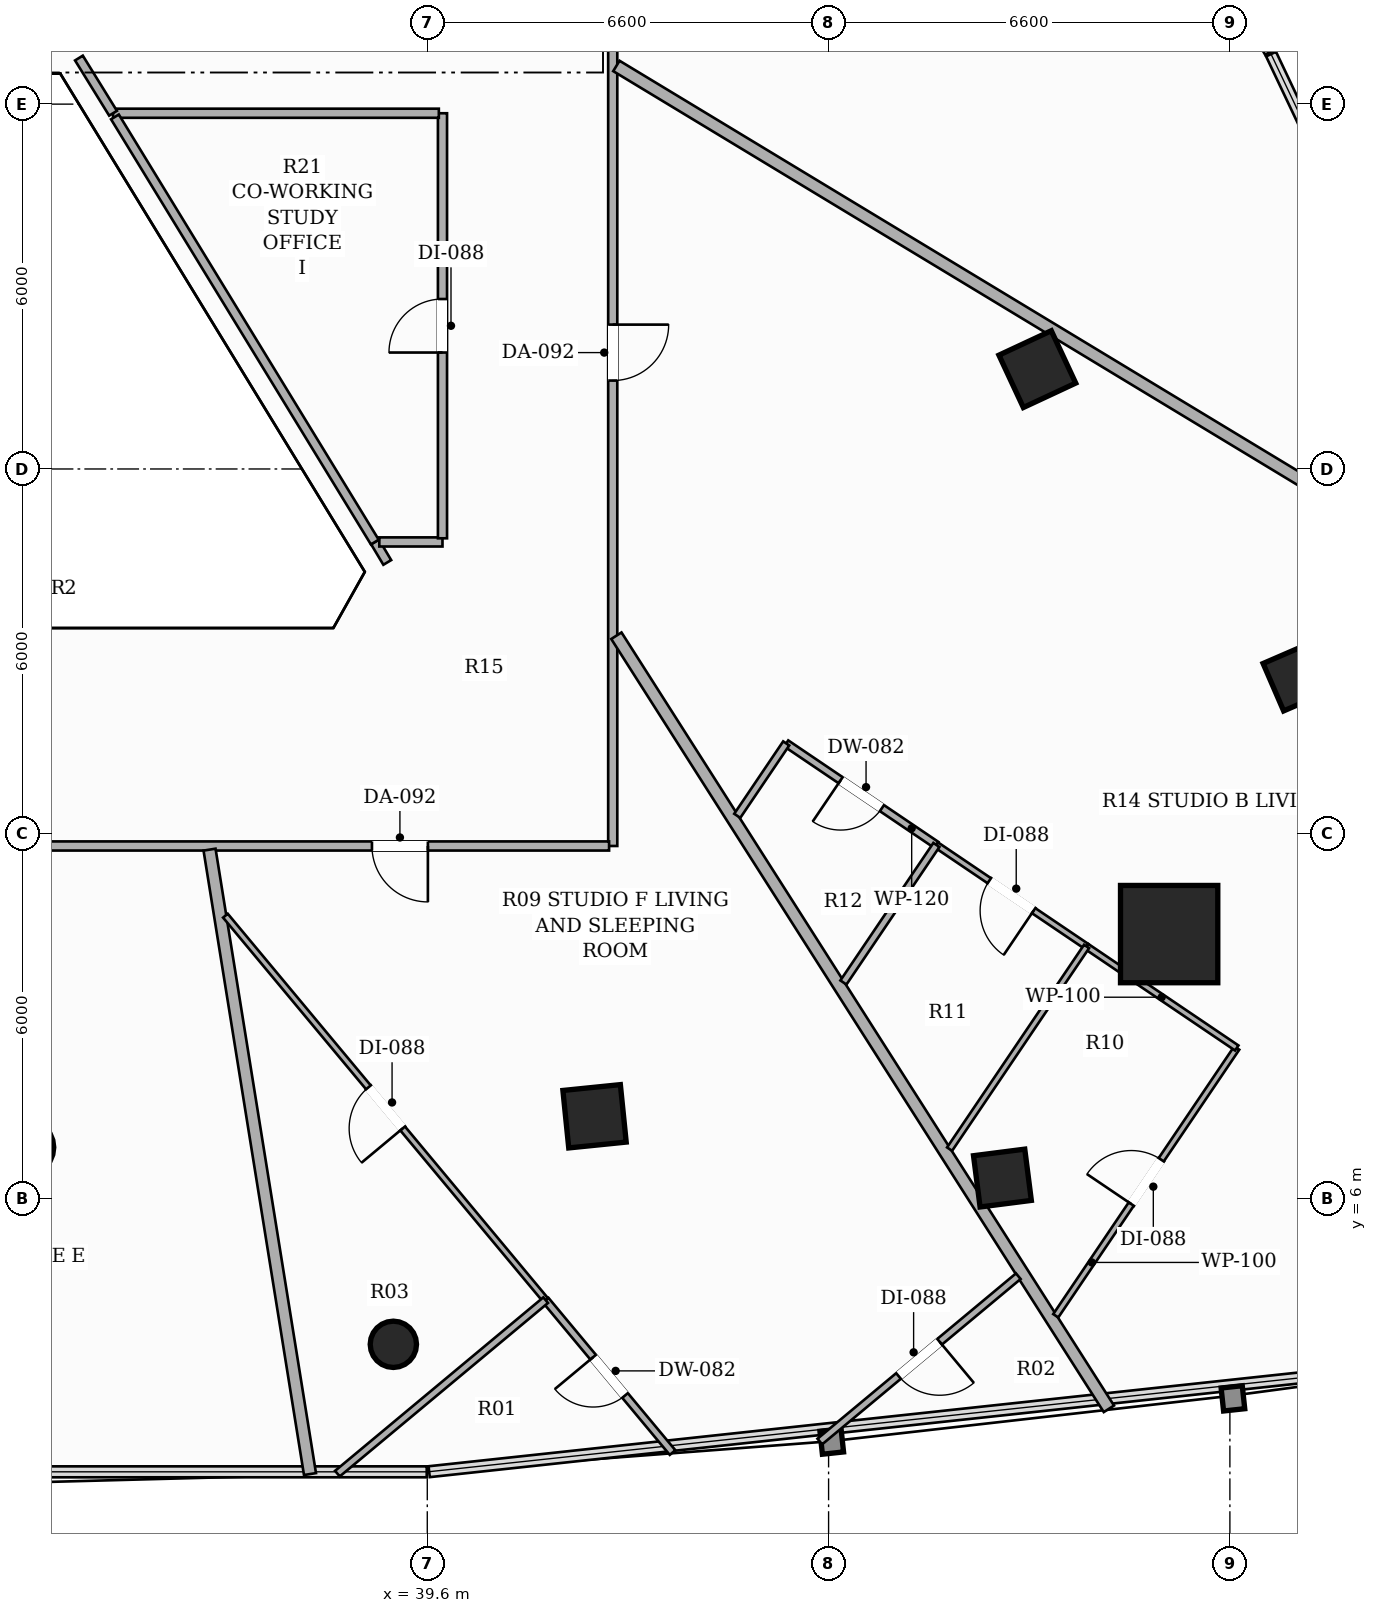
"""IFC4 building model, lengths in metres.
Left out: names, types, materials, properties, quantities, classifications, styles, units other than length and angle.
Written with IfcOpenShell. Run it as: python <this file> out.ifc"""

import sys

from ifc_helpers import new_model, si_unit, direction, frame, frame_2d, origin, origin_2d, place, context, subcontext, project, spatial, rectangle, hollow_rectangle, hollow_circle, extrude, element, fill, save


model = new_model("IFC4")
c1 = context("Model", 3, precision=1e-05, world=origin(), true_north=direction((0.0, 1.0)))
c2 = subcontext(c1, "Body", "Model", "MODEL_VIEW")
j1 = project(units=[si_unit("LENGTHUNIT", "METRE"), si_unit("PLANEANGLEUNIT", "RADIAN")], contexts=[c1])
p1 = place(None, origin())
s1 = spatial("IfcSite", under=j1, at=p1, CompositionType="ELEMENT")
p2 = place(p1, origin())
s2 = spatial("IfcBuilding", under=s1, at=p2, CompositionType="ELEMENT")
p3 = place(p2, frame((0.0, 0.0, 46.7)))
s3 = spatial("IfcBuildingStorey", under=s2, at=p3, CompositionType="ELEMENT", Elevation=46.7)
p4 = place(p3, frame((51.801, 10.351, 0.0), z_axis=(0.0, 0.0, 1.0), x_axis=(1.0, 0.0, 0.0)))
e1 = element("IfcColumn", 1, at=p4, inside=s3, PredefinedType="COLUMN", context=c2, shape_type="SweptSolid", body=[
    extrude(hollow_rectangle(XDim=1.6, YDim=1.6, WallThickness=0.05, at=origin_2d()), origin(), (0.0, 0.0, 1.0), 3.3),
])
p5 = place(p3, frame((33.0, 6.844, 0.0), z_axis=(0.0, 0.0, 1.0), x_axis=(1.0, 0.0, 0.0)))
e2 = element("IfcColumn", 2, at=p5, inside=s3, PredefinedType="COLUMN", context=c2, shape_type="SweptSolid", body=[
    extrude(hollow_circle(Radius=0.457, WallThickness=0.025, at=origin_2d()), origin(), (0.0, 0.0, 1.0), 3.3),
])
for number, where, z_axis, x_axis in (
    (3, (42.351, 7.355, 0.0), (0.0, 0.0, 1.0), (0.995, 0.101, 0.0)),
    (4, (49.633, 19.642, 0.0), (0.0, 0.0, 1.0), (-0.423, 0.906, 0.0)),
):
    element("IfcColumn", number, at=place(p3, frame(where, z_axis=z_axis, x_axis=x_axis)), inside=s3, PredefinedType="COLUMN", context=c2, shape_type="SweptSolid", body=[
        extrude(hollow_rectangle(XDim=0.95, YDim=0.95, WallThickness=0.032, at=origin_2d()), origin(), (0.0, 0.0, 1.0), 3.3),
    ])
for number, where, z_axis, x_axis in (
    (5, (49.059, 6.339, 0.0), (0.0, 0.0, 1.0), (0.992, 0.127, 0.0)),
    (6, (53.905, 14.58, 0.0), (0.0, 0.0, 1.0), (-0.397, 0.918, 0.0)),
):
    element("IfcColumn", number, at=place(p3, frame(where, z_axis=z_axis, x_axis=x_axis)), inside=s3, PredefinedType="COLUMN", context=c2, shape_type="SweptSolid", body=[
        extrude(hollow_rectangle(XDim=0.85, YDim=0.85, WallThickness=0.028, at=origin_2d()), origin(), (0.0, 0.0, 1.0), 3.3),
    ])
p6 = place(p3, frame((39.042, 3.605, 0.0), z_axis=(0.0, 0.0, 1.0), x_axis=(1.0, 0.0, 0.0)))
e7 = element("IfcColumn", 7, at=p6, inside=s3, PredefinedType="COLUMN", context=c2, shape_type="SweptSolid", body=[
    extrude(hollow_circle(Radius=0.381, WallThickness=0.022, at=origin_2d()), origin(), (0.0, 0.0, 1.0), 3.3),
])
p7 = place(p3, frame((42.65, 36.84, 0.0), z_axis=(0.0, 0.0, 1.0), x_axis=(0.0, -1.0, 0.0)))
e8 = element("IfcWall", 8, at=p7, inside=s3, PredefinedType="PARTITIONING", context=c2, shape_type="SweptSolid", body=[
    extrude(rectangle(XDim=25.04, YDim=0.15, at=frame_2d((12.52, 0.0))), origin(), (0.0, 0.0, 1.0), 2.413),
])
p8 = place(p7, frame((16.466, 0.0, 0.0)))
e9 = element("IfcOpeningElement", 9, at=p8, cuts=e8, PredefinedType="OPENING", context=c2, shape_type="SweptSolid", body=[
    extrude(rectangle(XDim=0.92, YDim=2.15, at=frame_2d((0.46, 1.075))), frame((0.0, 0.085, 0.0), z_axis=(0.0, -1.0, 0.0), x_axis=(1.0, 0.0, 0.0)), (0.0, 0.0, 1.0), 0.17),
])
p9 = place(p7, frame((5.796, 0.0, 0.0)))
e10 = element("IfcOpeningElement", 10, at=p9, cuts=e8, PredefinedType="OPENING", context=c2, shape_type="SweptSolid", body=[
    extrude(rectangle(XDim=0.92, YDim=2.15, at=frame_2d((0.46, 1.075))), frame((0.0, 0.085, 0.0), z_axis=(0.0, -1.0, 0.0), x_axis=(1.0, 0.0, 0.0)), (0.0, 0.0, 1.0), 0.17),
])
p10 = place(p3, frame((42.59, 11.8, 0.0), z_axis=(0.0, 0.0, 1.0), x_axis=(-1.0, 0.0, 0.0)))
e11 = element("IfcWall", 11, at=p10, inside=s3, PredefinedType="PARTITIONING", context=c2, shape_type="SweptSolid", body=[
    extrude(rectangle(XDim=19.24, YDim=0.15, at=frame_2d((9.62, 0.0))), origin(), (0.0, 0.0, 1.0), 2.669),
])
p11 = place(p10, frame((10.508, 0.0, 0.0)))
e12 = element("IfcOpeningElement", 12, at=p11, cuts=e11, PredefinedType="OPENING", context=c2, shape_type="SweptSolid", body=[
    extrude(rectangle(XDim=0.88, YDim=2.1, at=frame_2d((0.44, 1.05))), frame((0.0, 0.085, 0.0), z_axis=(0.0, -1.0, 0.0), x_axis=(1.0, 0.0, 0.0)), (0.0, 0.0, 1.0), 0.17),
])
p12 = place(p10, frame((2.98, 0.0, 0.0)))
e13 = element("IfcOpeningElement", 13, at=p12, cuts=e11, PredefinedType="OPENING", context=c2, shape_type="SweptSolid", body=[
    extrude(rectangle(XDim=0.92, YDim=2.15, at=frame_2d((0.46, 1.075))), frame((0.0, 0.085, 0.0), z_axis=(0.0, -1.0, 0.0), x_axis=(1.0, 0.0, 0.0)), (0.0, 0.0, 1.0), 0.17),
])
p13 = place(p3, frame((38.942, 16.463, 0.0), z_axis=(0.0, 0.0, 1.0), x_axis=(-0.511932152937, 0.859025884819, 0.0)))
e14 = element("IfcWall", 14, at=p13, inside=s3, PredefinedType="PARTITIONING", context=c2, shape_type="SweptSolid", body=[
    extrude(rectangle(XDim=0.393, YDim=0.15, at=frame_2d((0.196, 0.0))), origin(), (0.0, 0.0, 1.0), 3.06),
])
p14 = place(p3, frame((38.811, 16.8, 0.0), z_axis=(0.0, 0.0, 1.0), x_axis=(1.0, 0.0, 0.0)))
e15 = element("IfcWall", 15, at=p14, inside=s3, PredefinedType="PARTITIONING", context=c2, shape_type="SweptSolid", body=[
    extrude(rectangle(XDim=1.039, YDim=0.15, at=frame_2d((0.52, 0.0))), origin(), (0.0, 0.0, 1.0), 3.06),
])
p15 = place(p3, frame((39.85, 16.86, 0.0), z_axis=(0.0, 0.0, 1.0), x_axis=(0.0, 1.0, 0.0)))
e16 = element("IfcWall", 16, at=p15, inside=s3, PredefinedType="PARTITIONING", context=c2, shape_type="SweptSolid", body=[
    extrude(rectangle(XDim=6.99, YDim=0.15, at=frame_2d((3.495, 0.0))), origin(), (0.0, 0.0, 1.0), 2.669),
])
p16 = place(p15, frame((3.055, 0.0, 0.0)))
e17 = element("IfcOpeningElement", 17, at=p16, cuts=e16, PredefinedType="OPENING", context=c2, shape_type="SweptSolid", body=[
    extrude(rectangle(XDim=0.88, YDim=2.1, at=frame_2d((0.44, 1.05))), frame((0.0, 0.085, 0.0), z_axis=(0.0, -1.0, 0.0), x_axis=(1.0, 0.0, 0.0)), (0.0, 0.0, 1.0), 0.17),
])
p17 = place(p3, frame((39.79, 23.85, 0.0), z_axis=(0.0, 0.0, 1.0), x_axis=(-1.0, 0.0, 0.0)))
e18 = element("IfcWall", 18, at=p17, inside=s3, PredefinedType="PARTITIONING", context=c2, shape_type="SweptSolid", body=[
    extrude(rectangle(XDim=5.358, YDim=0.15, at=frame_2d((2.679, 0.0))), origin(), (0.0, 0.0, 1.0), 2.669),
])
p18 = place(p3, frame((34.432, 23.85, 0.0), z_axis=(0.0, 0.0, 1.0), x_axis=(-0.525488010188, 0.850801005611, 0.0)))
e19 = element("IfcWall", 19, at=p18, inside=s3, PredefinedType="PARTITIONING", context=c2, shape_type="SweptSolid", body=[
    extrude(rectangle(XDim=1.067, YDim=0.15, at=frame_2d((0.534, 0.0))), origin(), (0.0, 0.0, 1.0), 3.06),
])
p19 = place(p3, frame((34.463, 23.79, 0.0), z_axis=(0.0, 0.0, 1.0), x_axis=(0.521566895949, -0.853210392019, 0.0)))
e20 = element("IfcWall", 20, at=p19, inside=s3, PredefinedType="PARTITIONING", context=c2, shape_type="SweptSolid", body=[
    extrude(rectangle(XDim=8.195, YDim=0.15, at=frame_2d((4.097, 0.0))), origin(), (0.0, 0.0, 1.0), 2.669),
])
p20 = place(p3, frame((42.71, 24.628, 0.0), z_axis=(0.0, 0.0, 1.0), x_axis=(0.85570509792, -0.517463801047, 0.0)))
e21 = element("IfcWall", 21, at=p20, inside=s3, PredefinedType="PARTITIONING", context=c2, shape_type="SweptSolid", body=[
    extrude(rectangle(XDim=17.86, YDim=0.2, at=frame_2d((8.93, 0.0))), origin(), (0.0, 0.0, 1.0), 2.413),
])
p21 = place(p3, frame((50.81, 2.544, 0.0), z_axis=(0.0, 0.0, 1.0), x_axis=(-0.537314491885, 0.843381963769, 0.0)))
e22 = element("IfcWall", 22, at=p21, inside=s3, PredefinedType="PARTITIONING", context=c2, shape_type="SweptSolid", body=[
    extrude(rectangle(XDim=15.075, YDim=0.2, at=frame_2d((7.538, 0.0))), origin(), (0.0, 0.0, 1.0), 2.413),
])
p22 = place(p3, frame((36.019, 11.74, 0.0), z_axis=(0.0, 0.0, 1.0), x_axis=(0.158816201081, -0.98730816581, 0.0)))
e23 = element("IfcWall", 23, at=p22, inside=s3, PredefinedType="PARTITIONING", context=c2, shape_type="SweptSolid", body=[
    extrude(rectangle(XDim=10.401, YDim=0.2, at=frame_2d((5.201, 0.0))), origin(), (0.0, 0.0, 1.0), 2.413),
])
p23 = place(p3, frame((47.973, 11.817, 0.0), z_axis=(0.0, 0.0, 1.0), x_axis=(-0.82839181121, 0.560149093653, 0.0)))
e24 = element("IfcWall", 24, at=p23, inside=s3, PredefinedType="PARTITIONING", context=c2, shape_type="SweptSolid", body=[
    extrude(rectangle(XDim=2.982, YDim=0.12, at=frame_2d((1.491, 0.0))), origin(), (0.0, 0.0, 1.0), 2.669),
])
p24 = place(p23, frame((1.081, 0.0, 0.0)))
e25 = element("IfcOpeningElement", 25, at=p24, cuts=e24, PredefinedType="OPENING", context=c2, shape_type="SweptSolid", body=[
    extrude(rectangle(XDim=0.82, YDim=2.1, at=frame_2d((0.41, 1.05))), frame((0.0, 0.07, 0.0), z_axis=(0.0, -1.0, 0.0), x_axis=(1.0, 0.0, 0.0)), (0.0, 0.0, 1.0), 0.14),
])
p25 = place(p3, frame((45.503, 13.487, 0.0), z_axis=(0.0, 0.0, 1.0), x_axis=(-0.559901526605, -0.828559159328, 0.0)))
e26 = element("IfcWall", 26, at=p25, inside=s3, PredefinedType="PARTITIONING", context=c2, shape_type="SweptSolid", body=[
    extrude(rectangle(XDim=1.438, YDim=0.12, at=frame_2d((0.719, 0.0))), origin(), (0.0, 0.0, 1.0), 2.669),
])
p26 = place(p3, frame((49.936, 4.074, 0.0), z_axis=(0.0, 0.0, 1.0), x_axis=(0.560030395854, 0.828472060917, 0.0)))
e27 = element("IfcWall", 27, at=p26, inside=s3, PredefinedType="PARTITIONING", context=c2, shape_type="SweptSolid", body=[
    extrude(rectangle(XDim=5.316, YDim=0.1, at=frame_2d((2.658, 0.0))), origin(), (0.0, 0.0, 1.0), 3.06),
])
p27 = place(p26, frame((2.218, 0.0, 0.0)))
e28 = element("IfcOpeningElement", 28, at=p27, cuts=e27, PredefinedType="OPENING", context=c2, shape_type="SweptSolid", body=[
    extrude(rectangle(XDim=0.88, YDim=2.1, at=frame_2d((0.44, 1.05))), frame((0.0, 0.06, 0.0), z_axis=(0.0, -1.0, 0.0), x_axis=(1.0, 0.0, 0.0)), (0.0, 0.0, 1.0), 0.12),
])
p28 = place(p3, frame((52.913, 8.478, 0.0), z_axis=(0.0, 0.0, 1.0), x_axis=(-0.828429805787, 0.560092900226, 0.0)))
e29 = element("IfcWall", 29, at=p28, inside=s3, PredefinedType="PARTITIONING", context=c2, shape_type="SweptSolid", body=[
    extrude(rectangle(XDim=2.981, YDim=0.1, at=frame_2d((1.491, 0.0))), origin(), (0.0, 0.0, 1.0), 2.413),
])
p29 = place(p3, frame((50.443, 10.148, 0.0), z_axis=(0.0, 0.0, 1.0), x_axis=(-0.828607449923, 0.559830058082, 0.0)))
e30 = element("IfcWall", 30, at=p29, inside=s3, PredefinedType="PARTITIONING", context=c2, shape_type="SweptSolid", body=[
    extrude(rectangle(XDim=2.981, YDim=0.1, at=frame_2d((1.491, 0.0))), origin(), (0.0, 0.0, 1.0), 3.06),
])
p30 = place(p29, frame((1.051, 0.0, 0.0)))
e31 = element("IfcOpeningElement", 31, at=p30, cuts=e30, PredefinedType="OPENING", context=c2, shape_type="SweptSolid", body=[
    extrude(rectangle(XDim=0.88, YDim=2.1, at=frame_2d((0.44, 1.05))), frame((0.0, 0.06, 0.0), z_axis=(0.0, -1.0, 0.0), x_axis=(1.0, 0.0, 0.0)), (0.0, 0.0, 1.0), 0.12),
])
p31 = place(p3, frame((47.973, 11.817, 0.0), z_axis=(0.0, 0.0, 1.0), x_axis=(-0.559971898906, -0.828511600665, 0.0)))
e32 = element("IfcWall", 32, at=p31, inside=s3, PredefinedType="PARTITIONING", context=c2, shape_type="SweptSolid", body=[
    extrude(rectangle(XDim=2.73, YDim=0.12, at=frame_2d((1.365, 0.0))), origin(), (0.0, 0.0, 1.0), 2.669),
])
p32 = place(p3, frame((48.19, 6.815, 0.0), z_axis=(0.0, 0.0, 1.0), x_axis=(0.560052199206, 0.828457321873, 0.0)))
e33 = element("IfcWall", 33, at=p32, inside=s3, PredefinedType="PARTITIONING", context=c2, shape_type="SweptSolid", body=[
    extrude(rectangle(XDim=4.023, YDim=0.1, at=frame_2d((2.012, 0.0))), origin(), (0.0, 0.0, 1.0), 2.413),
])
p33 = place(p3, frame((43.634, 1.825, 0.0), z_axis=(0.0, 0.0, 1.0), x_axis=(-0.639911914418, 0.768448268777, 0.0)))
e34 = element("IfcWall", 34, at=p33, inside=s3, PredefinedType="PARTITIONING", context=c2, shape_type="SweptSolid", body=[
    extrude(rectangle(XDim=3.261, YDim=0.12, at=frame_2d((1.631, 0.0))), origin(), (0.0, 0.0, 1.0), 3.06),
])
p34 = place(p33, frame((1.221, 0.0, 0.0)))
e35 = element("IfcOpeningElement", 35, at=p34, cuts=e34, PredefinedType="OPENING", context=c2, shape_type="SweptSolid", body=[
    extrude(rectangle(XDim=0.82, YDim=2.1, at=frame_2d((0.41, 1.05))), frame((0.0, 0.07, 0.0), z_axis=(0.0, -1.0, 0.0), x_axis=(1.0, 0.0, 0.0)), (0.0, 0.0, 1.0), 0.14),
])
p35 = place(p3, frame((49.32, 4.725, 0.0), z_axis=(0.0, 0.0, 1.0), x_axis=(-0.768353158093, -0.640026112317, 0.0)))
e36 = element("IfcWall", 36, at=p35, inside=s3, PredefinedType="PARTITIONING", context=c2, shape_type="SweptSolid", body=[
    extrude(rectangle(XDim=4.248, YDim=0.12, at=frame_2d((2.124, 0.0))), origin(), (0.0, 0.0, 1.0), 3.06),
])
p36 = place(p35, frame((1.684, 0.0, 0.0)))
e37 = element("IfcOpeningElement", 37, at=p36, cuts=e36, PredefinedType="OPENING", context=c2, shape_type="SweptSolid", body=[
    extrude(rectangle(XDim=0.88, YDim=2.1, at=frame_2d((0.44, 1.05))), frame((0.0, 0.07, 0.0), z_axis=(0.0, -1.0, 0.0), x_axis=(1.0, 0.0, 0.0)), (0.0, 0.0, 1.0), 0.14),
])
p37 = place(p3, frame((41.547, 4.331, 0.0), z_axis=(0.0, 0.0, 1.0), x_axis=(-0.640035566376, 0.768345282913, 0.0)))
e38 = element("IfcWall", 38, at=p37, inside=s3, PredefinedType="PARTITIONING", context=c2, shape_type="SweptSolid", body=[
    extrude(rectangle(XDim=8.229, YDim=0.1, at=frame_2d((4.115, 0.0))), origin(), (0.0, 0.0, 1.0), 2.413),
])
p38 = place(p37, frame((3.675, 0.0, 0.0)))
e39 = element("IfcOpeningElement", 39, at=p38, cuts=e38, PredefinedType="OPENING", context=c2, shape_type="SweptSolid", body=[
    extrude(rectangle(XDim=0.88, YDim=2.1, at=frame_2d((0.44, 1.05))), frame((0.0, 0.06, 0.0), z_axis=(0.0, -1.0, 0.0), x_axis=(1.0, 0.0, 0.0)), (0.0, 0.0, 1.0), 0.12),
])
p39 = place(p3, frame((38.122, 1.478, 0.0), z_axis=(0.0, 0.0, 1.0), x_axis=(0.768351451836, 0.640028160678, 0.0)))
e40 = element("IfcWall", 40, at=p39, inside=s3, PredefinedType="PARTITIONING", context=c2, shape_type="SweptSolid", body=[
    extrude(rectangle(XDim=4.458, YDim=0.12, at=frame_2d((2.229, 0.0))), origin(), (0.0, 0.0, 1.0), 3.06),
])
p40 = place(p8, origin())
e41 = element("IfcDoor", 41, at=p40, inside=s3, OperationType="SINGLE_SWING_LEFT", PredefinedType="DOOR", context=c2, shape_type="SweptSolid", body=[
    extrude(rectangle(XDim=0.92, YDim=2.15, at=frame_2d((0.46, 1.075))), frame((0.0, 0.025, 0.0), z_axis=(0.0, -1.0, 0.0), x_axis=(1.0, 0.0, 0.0)), (0.0, 0.0, 1.0), 0.05),
])
fill(e9, e41)
p41 = place(p24, origin())
e42 = element("IfcDoor", 42, at=p41, inside=s3, OperationType="SINGLE_SWING_RIGHT", PredefinedType="DOOR", context=c2, shape_type="SweptSolid", body=[
    extrude(rectangle(XDim=0.82, YDim=2.1, at=frame_2d((0.41, 1.05))), frame((0.0, 0.025, 0.0), z_axis=(0.0, -1.0, 0.0), x_axis=(1.0, 0.0, 0.0)), (0.0, 0.0, 1.0), 0.05),
])
fill(e25, e42)
p42 = place(p27, origin())
e43 = element("IfcDoor", 43, at=p42, inside=s3, OperationType="SINGLE_SWING_LEFT", PredefinedType="DOOR", context=c2, shape_type="SweptSolid", body=[
    extrude(rectangle(XDim=0.88, YDim=2.1, at=frame_2d((0.44, 1.05))), frame((0.0, 0.025, 0.0), z_axis=(0.0, -1.0, 0.0), x_axis=(1.0, 0.0, 0.0)), (0.0, 0.0, 1.0), 0.05),
])
fill(e28, e43)
p43 = place(p30, origin())
e44 = element("IfcDoor", 44, at=p43, inside=s3, OperationType="SINGLE_SWING_LEFT", PredefinedType="DOOR", context=c2, shape_type="SweptSolid", body=[
    extrude(rectangle(XDim=0.88, YDim=2.1, at=frame_2d((0.44, 1.05))), frame((0.0, 0.025, 0.0), z_axis=(0.0, -1.0, 0.0), x_axis=(1.0, 0.0, 0.0)), (0.0, 0.0, 1.0), 0.05),
])
fill(e31, e44)
p44 = place(p12, origin())
e45 = element("IfcDoor", 45, at=p44, inside=s3, OperationType="SINGLE_SWING_LEFT", PredefinedType="DOOR", context=c2, shape_type="SweptSolid", body=[
    extrude(rectangle(XDim=0.92, YDim=2.15, at=frame_2d((0.46, 1.075))), frame((0.0, 0.025, 0.0), z_axis=(0.0, -1.0, 0.0), x_axis=(1.0, 0.0, 0.0)), (0.0, 0.0, 1.0), 0.05),
])
fill(e13, e45)
p45 = place(p34, origin())
e46 = element("IfcDoor", 46, at=p45, inside=s3, OperationType="SINGLE_SWING_RIGHT", PredefinedType="DOOR", context=c2, shape_type="SweptSolid", body=[
    extrude(rectangle(XDim=0.82, YDim=2.1, at=frame_2d((0.41, 1.05))), frame((0.0, 0.025, 0.0), z_axis=(0.0, -1.0, 0.0), x_axis=(1.0, 0.0, 0.0)), (0.0, 0.0, 1.0), 0.05),
])
fill(e35, e46)
p46 = place(p36, origin())
e47 = element("IfcDoor", 47, at=p46, inside=s3, OperationType="SINGLE_SWING_LEFT", PredefinedType="DOOR", context=c2, shape_type="SweptSolid", body=[
    extrude(rectangle(XDim=0.88, YDim=2.1, at=frame_2d((0.44, 1.05))), frame((0.0, 0.025, 0.0), z_axis=(0.0, -1.0, 0.0), x_axis=(1.0, 0.0, 0.0)), (0.0, 0.0, 1.0), 0.05),
])
fill(e37, e47)
p47 = place(p38, origin())
e48 = element("IfcDoor", 48, at=p47, inside=s3, OperationType="SINGLE_SWING_LEFT", PredefinedType="DOOR", context=c2, shape_type="SweptSolid", body=[
    extrude(rectangle(XDim=0.88, YDim=2.1, at=frame_2d((0.44, 1.05))), frame((0.0, 0.025, 0.0), z_axis=(0.0, -1.0, 0.0), x_axis=(1.0, 0.0, 0.0)), (0.0, 0.0, 1.0), 0.05),
])
fill(e39, e48)
p48 = place(p16, origin())
e49 = element("IfcDoor", 49, at=p48, inside=s3, OperationType="SINGLE_SWING_LEFT", PredefinedType="DOOR", context=c2, shape_type="SweptSolid", body=[
    extrude(rectangle(XDim=0.88, YDim=2.1, at=frame_2d((0.44, 1.05))), frame((0.0, 0.025, 0.0), z_axis=(0.0, -1.0, 0.0), x_axis=(1.0, 0.0, 0.0)), (0.0, 0.0, 1.0), 0.05),
])
fill(e17, e49)
save(model, sys.argv[1])
